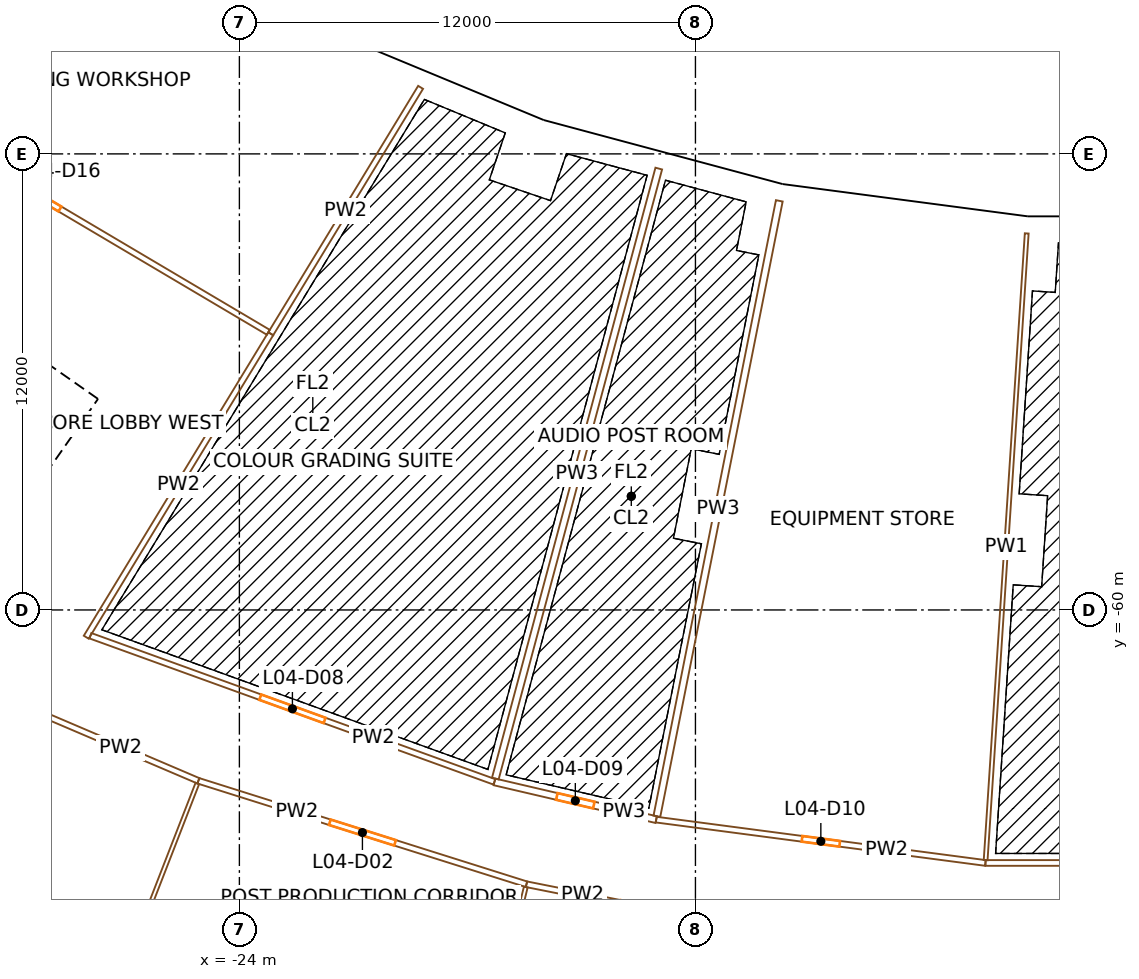
"""IFC4 building model, lengths in metres.
Left out: names, types, materials, properties, quantities, classifications, styles, units other than length and angle.
Written with IfcOpenShell. Run it as: python <this file> out.ifc"""

import sys

from ifc_helpers import new_model, si_unit, direction, frame, frame_2d, origin, origin_2d, place, context, subcontext, project, spatial, rectangle, extrude, element, fill, save


model = new_model("IFC4")
c1 = context("Model", 3, precision=1e-05, world=origin(), true_north=direction((0.0, 1.0)))
c2 = subcontext(c1, "Body", "Model", "MODEL_VIEW")
j1 = project(units=[si_unit("LENGTHUNIT", "METRE"), si_unit("PLANEANGLEUNIT", "RADIAN")], contexts=[c1])
p1 = place(None, origin())
s1 = spatial("IfcSite", under=j1, at=p1, CompositionType="ELEMENT")
p2 = place(p1, origin())
s2 = spatial("IfcBuilding", under=s1, at=p2, CompositionType="ELEMENT")
p3 = place(p2, frame((0.0, 0.0, 31.5)))
s3 = spatial("IfcBuildingStorey", under=s2, at=p3, CompositionType="ELEMENT", Elevation=31.5)
p4 = place(p3, frame((-22.446, -45.516, 0.0), z_axis=(0.0, 0.0, 1.0), x_axis=(0.896872741533, -0.442288690219, 0.0)))
e1 = element("IfcColumn", 1, at=p4, inside=s3, PredefinedType="COLUMN", context=c2, shape_type="SweptSolid", body=[
    extrude(rectangle(XDim=1.1, YDim=1.3, at=origin_2d()), origin(), (0.0, 0.0, 1.0), 4.5),
])
p5 = place(p3, frame((-25.763, -52.243, 0.0), z_axis=(0.0, 0.0, 1.0), x_axis=(0.896872741533, -0.442288690219, 0.0)))
e2 = element("IfcColumn", 2, at=p5, inside=s3, PredefinedType="COLUMN", context=c2, shape_type="SweptSolid", body=[
    extrude(rectangle(XDim=1.4, YDim=1.8, at=origin_2d()), origin(), (0.0, 0.0, 1.0), 4.5),
])
p6 = place(p3, frame((-16.313, -48.057, 0.0), z_axis=(0.0, 0.0, 1.0), x_axis=(0.946930129495, -0.321439465303, 0.0)))
e3 = element("IfcColumn", 3, at=p6, inside=s3, PredefinedType="COLUMN", context=c2, shape_type="SweptSolid", body=[
    extrude(rectangle(XDim=1.1, YDim=1.3, at=origin_2d()), origin(), (0.0, 0.0, 1.0), 4.5),
])
p7 = place(p3, frame((-18.724, -55.159, 0.0), z_axis=(0.0, 0.0, 1.0), x_axis=(0.946930129495, -0.321439465303, 0.0)))
e4 = element("IfcColumn", 4, at=p7, inside=s3, PredefinedType="COLUMN", context=c2, shape_type="SweptSolid", body=[
    extrude(rectangle(XDim=1.4, YDim=1.8, at=origin_2d()), origin(), (0.0, 0.0, 1.0), 4.5),
])
p8 = place(p3, frame((-9.901, -49.775, 0.0), z_axis=(0.0, 0.0, 1.0), x_axis=(0.980785280403, -0.195090322016, 0.0)))
e5 = element("IfcColumn", 5, at=p8, inside=s3, PredefinedType="COLUMN", context=c2, shape_type="SweptSolid", body=[
    extrude(rectangle(XDim=1.1, YDim=1.3, at=origin_2d()), origin(), (0.0, 0.0, 1.0), 4.5),
])
p9 = place(p3, frame((-11.364, -57.131, 0.0), z_axis=(0.0, 0.0, 1.0), x_axis=(0.980785280403, -0.195090322016, 0.0)))
e6 = element("IfcColumn", 6, at=p9, inside=s3, PredefinedType="COLUMN", context=c2, shape_type="SweptSolid", body=[
    extrude(rectangle(XDim=1.4, YDim=1.8, at=origin_2d()), origin(), (0.0, 0.0, 1.0), 4.5),
])
p10 = place(p3, frame((-3.319, -50.641, 0.0), z_axis=(0.0, 0.0, 1.0), x_axis=(0.997858923239, -0.06540312923, 0.0)))
e7 = element("IfcColumn", 7, at=p10, inside=s3, PredefinedType="COLUMN", context=c2, shape_type="SweptSolid", body=[
    extrude(rectangle(XDim=1.1, YDim=1.3, at=origin_2d()), origin(), (0.0, 0.0, 1.0), 4.5),
])
p11 = place(p3, frame((-3.81, -58.125, 0.0), z_axis=(0.0, 0.0, 1.0), x_axis=(0.997858923239, -0.06540312923, 0.0)))
e8 = element("IfcColumn", 8, at=p11, inside=s3, PredefinedType="COLUMN", context=c2, shape_type="SweptSolid", body=[
    extrude(rectangle(XDim=1.4, YDim=1.8, at=origin_2d()), origin(), (0.0, 0.0, 1.0), 4.5),
])
p12 = place(p3, frame((-36.717, -66.337, 0.0), z_axis=(0.0, 0.0, 1.0), x_axis=(0.573577477574, 0.819151315216, 0.0)))
e9 = element("IfcWall", 9, at=p12, inside=s3, PredefinedType="SHEAR", context=c2, shape_type="SweptSolid", body=[
    extrude(rectangle(XDim=14.8, YDim=0.9, at=frame_2d((7.4, 0.0))), origin(), (0.0, 0.0, 1.0), 4.1),
])
p13 = place(p12, frame((6.2, 0.0, 0.0)))
e10 = element("IfcOpeningElement", 10, at=p13, cuts=e9, PredefinedType="OPENING", context=c2, shape_type="SweptSolid", body=[
    extrude(rectangle(XDim=2.4, YDim=2.1, at=frame_2d((1.2, 1.05))), frame((0.0, 0.46, 0.0), z_axis=(0.0, -1.0, 0.0), x_axis=(1.0, 0.0, 0.0)), (0.0, 0.0, 1.0), 0.92),
])
p14 = place(p3, frame((-28.854, -54.324, 0.0), z_axis=(0.0, 0.0, 1.0), x_axis=(-0.819145767589, 0.573585400304, 0.0)))
e11 = element("IfcWall", 11, at=p14, inside=s3, PredefinedType="SHEAR", context=c2, shape_type="SweptSolid", body=[
    extrude(rectangle(XDim=15.045, YDim=0.9, at=frame_2d((7.523, 0.0))), origin(), (0.0, 0.0, 1.0), 4.1),
])
p15 = place(p14, frame((1.05, 0.0, 0.0)))
e12 = element("IfcOpeningElement", 12, at=p15, cuts=e11, PredefinedType="OPENING", context=c2, shape_type="SweptSolid", body=[
    extrude(rectangle(XDim=0.9, YDim=2.1, at=frame_2d((0.45, 1.05))), frame((0.0, 0.46, 0.0), z_axis=(0.0, -1.0, 0.0), x_axis=(1.0, 0.0, 0.0)), (0.0, 0.0, 1.0), 0.92),
])
p16 = place(p14, frame((3.775, 0.0, 0.0)))
e13 = element("IfcOpeningElement", 13, at=p16, cuts=e11, PredefinedType="OPENING", context=c2, shape_type="SweptSolid", body=[
    extrude(rectangle(XDim=1.0, YDim=2.1, at=frame_2d((0.5, 1.05))), frame((0.0, 0.46, 0.0), z_axis=(0.0, -1.0, 0.0), x_axis=(1.0, 0.0, 0.0)), (0.0, 0.0, 1.0), 0.92),
])
p17 = place(p14, frame((6.275, 0.0, 0.0)))
e14 = element("IfcOpeningElement", 14, at=p17, cuts=e11, PredefinedType="OPENING", context=c2, shape_type="SweptSolid", body=[
    extrude(rectangle(XDim=1.0, YDim=2.1, at=frame_2d((0.5, 1.05))), frame((0.0, 0.46, 0.0), z_axis=(0.0, -1.0, 0.0), x_axis=(1.0, 0.0, 0.0)), (0.0, 0.0, 1.0), 0.92),
])
p18 = place(p14, frame((13.495, 0.0, 0.0)))
e15 = element("IfcOpeningElement", 15, at=p18, cuts=e11, PredefinedType="OPENING", context=c2, shape_type="SweptSolid", body=[
    extrude(rectangle(XDim=1.1, YDim=2.1, at=frame_2d((0.55, 1.05))), frame((0.0, 0.46, 0.0), z_axis=(0.0, -1.0, 0.0), x_axis=(1.0, 0.0, 0.0)), (0.0, 0.0, 1.0), 0.92),
])
p19 = place(p3, frame((3.21, -49.868, 0.0), z_axis=(0.0, 0.0, 1.0), x_axis=(-1.0, 0.0, 0.0)))
e16 = element("IfcWall", 16, at=p19, inside=s3, PredefinedType="SOLIDWALL", context=c2, shape_type="SweptSolid", body=[
    extrude(rectangle(XDim=6.419, YDim=0.45, at=frame_2d((3.21, 0.0))), origin(), (0.0, 0.0, 1.0), 3.2),
])
p20 = place(p19, frame((3.66, 0.0, 0.9)))
e17 = element("IfcOpeningElement", 17, at=p20, cuts=e16, PredefinedType="OPENING", context=c2, shape_type="SweptSolid", body=[
    extrude(rectangle(XDim=1.2, YDim=2.15, at=frame_2d((0.6, 1.075))), frame((0.0, 0.235, 0.0), z_axis=(0.0, -1.0, 0.0), x_axis=(1.0, 0.0, 0.0)), (0.0, 0.0, 1.0), 0.47),
])
p21 = place(p19, frame((1.56, 0.0, 0.9)))
e18 = element("IfcOpeningElement", 18, at=p21, cuts=e16, PredefinedType="OPENING", context=c2, shape_type="SweptSolid", body=[
    extrude(rectangle(XDim=1.2, YDim=2.15, at=frame_2d((0.6, 1.075))), frame((0.0, 0.235, 0.0), z_axis=(0.0, -1.0, 0.0), x_axis=(1.0, 0.0, 0.0)), (0.0, 0.0, 1.0), 0.47),
])
p22 = place(p3, frame((-16.036, -47.335, 0.0), z_axis=(0.0, 0.0, 1.0), x_axis=(-0.923877459804, 0.382688436284, 0.0)))
e19 = element("IfcWall", 19, at=p22, inside=s3, PredefinedType="SOLIDWALL", context=c2, shape_type="SweptSolid", body=[
    extrude(rectangle(XDim=6.597, YDim=0.45, at=frame_2d((3.299, 0.0))), origin(), (0.0, 0.0, 1.0), 3.2),
])
p23 = place(p22, frame((3.749, 0.0, 0.9)))
e20 = element("IfcOpeningElement", 20, at=p23, cuts=e19, PredefinedType="OPENING", context=c2, shape_type="SweptSolid", body=[
    extrude(rectangle(XDim=1.2, YDim=2.15, at=frame_2d((0.6, 1.075))), frame((0.0, 0.235, 0.0), z_axis=(0.0, -1.0, 0.0), x_axis=(1.0, 0.0, 0.0)), (0.0, 0.0, 1.0), 0.47),
])
p24 = place(p22, frame((1.648, 0.0, 0.9)))
e21 = element("IfcOpeningElement", 21, at=p24, cuts=e19, PredefinedType="OPENING", context=c2, shape_type="SweptSolid", body=[
    extrude(rectangle(XDim=1.2, YDim=2.15, at=frame_2d((0.6, 1.075))), frame((0.0, 0.235, 0.0), z_axis=(0.0, -1.0, 0.0), x_axis=(1.0, 0.0, 0.0)), (0.0, 0.0, 1.0), 0.47),
])
p25 = place(p3, frame((-9.807, -49.0, 0.0), z_axis=(0.0, 0.0, 1.0), x_axis=(-0.965926830738, 0.25881529642, 0.0)))
e22 = element("IfcWall", 22, at=p25, inside=s3, PredefinedType="SOLIDWALL", context=c2, shape_type="SweptSolid", body=[
    extrude(rectangle(XDim=6.419, YDim=0.45, at=frame_2d((3.209, 0.0))), origin(), (0.0, 0.0, 1.0), 3.2),
])
p26 = place(p25, frame((3.66, 0.0, 0.9)))
e23 = element("IfcOpeningElement", 23, at=p26, cuts=e22, PredefinedType="OPENING", context=c2, shape_type="SweptSolid", body=[
    extrude(rectangle(XDim=1.2, YDim=2.15, at=frame_2d((0.6, 1.075))), frame((0.0, 0.235, 0.0), z_axis=(0.0, -1.0, 0.0), x_axis=(1.0, 0.0, 0.0)), (0.0, 0.0, 1.0), 0.47),
])
p27 = place(p25, frame((1.56, 0.0, 0.9)))
e24 = element("IfcOpeningElement", 24, at=p27, cuts=e22, PredefinedType="OPENING", context=c2, shape_type="SweptSolid", body=[
    extrude(rectangle(XDim=1.2, YDim=2.15, at=frame_2d((0.6, 1.075))), frame((0.0, 0.235, 0.0), z_axis=(0.0, -1.0, 0.0), x_axis=(1.0, 0.0, 0.0)), (0.0, 0.0, 1.0), 0.47),
])
p28 = place(p3, frame((-3.239, -49.872, 0.0), z_axis=(0.0, 0.0, 1.0), x_axis=(-0.991445350147, 0.130522479563, 0.0)))
e25 = element("IfcWall", 25, at=p28, inside=s3, PredefinedType="SOLIDWALL", context=c2, shape_type="SweptSolid", body=[
    extrude(rectangle(XDim=6.597, YDim=0.45, at=frame_2d((3.299, 0.0))), origin(), (0.0, 0.0, 1.0), 3.2),
])
p29 = place(p28, frame((3.749, 0.0, 0.9)))
e26 = element("IfcOpeningElement", 26, at=p29, cuts=e25, PredefinedType="OPENING", context=c2, shape_type="SweptSolid", body=[
    extrude(rectangle(XDim=1.2, YDim=2.15, at=frame_2d((0.6, 1.075))), frame((0.0, 0.235, 0.0), z_axis=(0.0, -1.0, 0.0), x_axis=(1.0, 0.0, 0.0)), (0.0, 0.0, 1.0), 0.47),
])
p30 = place(p28, frame((1.648, 0.0, 0.9)))
e27 = element("IfcOpeningElement", 27, at=p30, cuts=e25, PredefinedType="OPENING", context=c2, shape_type="SweptSolid", body=[
    extrude(rectangle(XDim=1.2, YDim=2.15, at=frame_2d((0.6, 1.075))), frame((0.0, 0.235, 0.0), z_axis=(0.0, -1.0, 0.0), x_axis=(1.0, 0.0, 0.0)), (0.0, 0.0, 1.0), 0.47),
])
p31 = place(p3, frame((-35.065, -45.697, 0.0), z_axis=(0.0, 0.0, 1.0), x_axis=(0.860638818745, -0.509215891022, 0.0)))
e28 = element("IfcWall", 28, at=p31, inside=s3, PredefinedType="PARTITIONING", context=c2, shape_type="SweptSolid", body=[
    extrude(rectangle(XDim=13.741, YDim=0.15, at=frame_2d((6.871, 0.0))), origin(), (0.0, 0.0, 1.0), 3.1),
])
p32 = place(p31, frame((6.37, 0.0, 0.0)))
e29 = element("IfcOpeningElement", 29, at=p32, cuts=e28, PredefinedType="OPENING", context=c2, shape_type="SweptSolid", body=[
    extrude(rectangle(XDim=1.0, YDim=2.1, at=frame_2d((0.5, 1.05))), frame((0.0, 0.085, 0.0), z_axis=(0.0, -1.0, 0.0), x_axis=(1.0, 0.0, 0.0)), (0.0, 0.0, 1.0), 0.17),
])
p33 = place(p3, frame((-31.035, -79.814, 0.0), z_axis=(0.0, 0.0, 1.0), x_axis=(0.362399453939, 0.932022872995, 0.0)))
e30 = element("IfcWall", 30, at=p33, inside=s3, PredefinedType="PARTITIONING", context=c2, shape_type="SweptSolid", body=[
    extrude(rectangle(XDim=16.361, YDim=0.1, at=frame_2d((8.18, 0.0))), origin(), (0.0, 0.0, 1.0), 3.1),
])
p34 = place(p3, frame((-29.177, -62.746, 0.0), z_axis=(0.0, 0.0, 1.0), x_axis=(0.91966288709, -0.392708765001, 0.0)))
e31 = element("IfcWall", 31, at=p34, inside=s3, PredefinedType="PARTITIONING", context=c2, shape_type="SweptSolid", body=[
    extrude(rectangle(XDim=4.456, YDim=0.15, at=frame_2d((2.228, 0.0))), origin(), (0.0, 0.0, 1.0), 3.1),
])
p35 = place(p3, frame((-27.92, -60.678, 0.0), z_axis=(0.0, 0.0, 1.0), x_axis=(0.940369024046, -0.340155991589, 0.0)))
e32 = element("IfcWall", 32, at=p35, inside=s3, PredefinedType="PARTITIONING", context=c2, shape_type="SweptSolid", body=[
    extrude(rectangle(XDim=11.305, YDim=0.15, at=frame_2d((5.652, 0.0))), origin(), (0.0, 0.0, 1.0), 3.1),
])
p36 = place(p35, frame((4.752, 0.0, 0.0)))
e33 = element("IfcOpeningElement", 33, at=p36, cuts=e32, PredefinedType="OPENING", context=c2, shape_type="SweptSolid", body=[
    extrude(rectangle(XDim=1.8, YDim=2.1, at=frame_2d((0.9, 1.05))), frame((0.0, 0.085, 0.0), z_axis=(0.0, -1.0, 0.0), x_axis=(1.0, 0.0, 0.0)), (0.0, 0.0, 1.0), 0.17),
])
p37 = place(p3, frame((-16.446, -67.217, 0.0), z_axis=(0.0, 0.0, 1.0), x_axis=(-0.953724416281, 0.300682120834, 0.0)))
e34 = element("IfcWall", 34, at=p37, inside=s3, PredefinedType="PARTITIONING", context=c2, shape_type="SweptSolid", body=[
    extrude(rectangle(XDim=9.052, YDim=0.15, at=frame_2d((4.526, 0.0))), origin(), (0.0, 0.0, 1.0), 3.1),
])
p38 = place(p37, frame((3.626, 0.0, 0.0)))
e35 = element("IfcOpeningElement", 35, at=p38, cuts=e34, PredefinedType="OPENING", context=c2, shape_type="SweptSolid", body=[
    extrude(rectangle(XDim=1.8, YDim=2.1, at=frame_2d((0.9, 1.05))), frame((0.0, 0.085, 0.0), z_axis=(0.0, -1.0, 0.0), x_axis=(1.0, 0.0, 0.0)), (0.0, 0.0, 1.0), 0.17),
])
p39 = place(p3, frame((-23.174, -52.732, 0.0), z_axis=(0.0, 0.0, 1.0), x_axis=(-0.519577254173, -0.854423476355, 0.0)))
e36 = element("IfcWall", 36, at=p39, inside=s3, PredefinedType="PARTITIONING", context=c2, shape_type="SweptSolid", body=[
    extrude(rectangle(XDim=9.345, YDim=0.15, at=frame_2d((4.672, 0.0))), origin(), (0.0, 0.0, 1.0), 3.1),
])
p40 = place(p3, frame((-20.352, -83.182, 0.0), z_axis=(0.0, 0.0, 1.0), x_axis=(0.23765209547, 0.971350339228, 0.0)))
e37 = element("IfcWall", 37, at=p40, inside=s3, PredefinedType="PARTITIONING", context=c2, shape_type="SweptSolid", body=[
    extrude(rectangle(XDim=16.361, YDim=0.1, at=frame_2d((8.18, 0.0))), origin(), (0.0, 0.0, 1.0), 3.1),
])
p41 = place(p3, frame((-19.231, -46.249, 0.0), z_axis=(0.0, 0.0, 1.0), x_axis=(-0.519582509181, -0.854420280748, 0.0)))
e38 = element("IfcWall", 38, at=p41, inside=s3, PredefinedType="PARTITIONING", context=c2, shape_type="SweptSolid", body=[
    extrude(rectangle(XDim=7.588, YDim=0.15, at=frame_2d((3.794, 0.0))), origin(), (0.0, 0.0, 1.0), 3.1),
])
p42 = place(p3, frame((-17.289, -64.524, 0.0), z_axis=(0.0, 0.0, 1.0), x_axis=(0.973886095728, -0.227037161159, 0.0)))
e39 = element("IfcWall", 39, at=p42, inside=s3, PredefinedType="PARTITIONING", context=c2, shape_type="SweptSolid", body=[
    extrude(rectangle(XDim=4.371, YDim=0.18, at=frame_2d((2.186, 0.0))), origin(), (0.0, 0.0, 1.0), 3.1),
])
p43 = place(p42, frame((1.686, 0.0, 0.0)))
e40 = element("IfcOpeningElement", 40, at=p43, cuts=e39, PredefinedType="OPENING", context=c2, shape_type="SweptSolid", body=[
    extrude(rectangle(XDim=1.0, YDim=2.1, at=frame_2d((0.5, 1.05))), frame((0.0, 0.1, 0.0), z_axis=(0.0, -1.0, 0.0), x_axis=(1.0, 0.0, 0.0)), (0.0, 0.0, 1.0), 0.2),
])
p44 = place(p3, frame((-10.529, -68.394, 0.0), z_axis=(0.0, 0.0, 1.0), x_axis=(-0.980785582749, 0.195088802015, 0.0)))
e41 = element("IfcWall", 41, at=p44, inside=s3, PredefinedType="PARTITIONING", context=c2, shape_type="SweptSolid", body=[
    extrude(rectangle(XDim=6.033, YDim=0.15, at=frame_2d((3.017, 0.0))), origin(), (0.0, 0.0, 1.0), 3.1),
])
p45 = place(p44, frame((2.517, 0.0, 0.0)))
e42 = element("IfcOpeningElement", 42, at=p45, cuts=e41, PredefinedType="OPENING", context=c2, shape_type="SweptSolid", body=[
    extrude(rectangle(XDim=1.0, YDim=2.1, at=frame_2d((0.5, 1.05))), frame((0.0, 0.085, 0.0), z_axis=(0.0, -1.0, 0.0), x_axis=(1.0, 0.0, 0.0)), (0.0, 0.0, 1.0), 0.17),
])
p46 = place(p3, frame((-13.032, -65.516, 0.0), z_axis=(0.0, 0.0, 1.0), x_axis=(0.991443260322, -0.130538352841, 0.0)))
e43 = element("IfcWall", 43, at=p46, inside=s3, PredefinedType="PARTITIONING", context=c2, shape_type="SweptSolid", body=[
    extrude(rectangle(XDim=8.738, YDim=0.15, at=frame_2d((4.369, 0.0))), origin(), (0.0, 0.0, 1.0), 3.1),
])
p47 = place(p46, frame((3.869, 0.0, 0.0)))
e44 = element("IfcOpeningElement", 44, at=p47, cuts=e43, PredefinedType="OPENING", context=c2, shape_type="SweptSolid", body=[
    extrude(rectangle(XDim=1.0, YDim=2.1, at=frame_2d((0.5, 1.05))), frame((0.0, 0.085, 0.0), z_axis=(0.0, -1.0, 0.0), x_axis=(1.0, 0.0, 0.0)), (0.0, 0.0, 1.0), 0.17),
])
p48 = place(p3, frame((-12.965, -48.386, 0.0), z_axis=(0.0, 0.0, 1.0), x_axis=(-0.258822009397, -0.965925032004, 0.0)))
e45 = element("IfcWall", 45, at=p48, inside=s3, PredefinedType="PARTITIONING", context=c2, shape_type="SweptSolid", body=[
    extrude(rectangle(XDim=16.617, YDim=0.18, at=frame_2d((8.308, 0.0))), origin(), (0.0, 0.0, 1.0), 3.1),
])
p49 = place(p3, frame((-9.793, -49.235, 0.0), z_axis=(0.0, 0.0, 1.0), x_axis=(-0.195089444663, -0.980785454919, 0.0)))
e46 = element("IfcWall", 46, at=p49, inside=s3, PredefinedType="PARTITIONING", context=c2, shape_type="SweptSolid", body=[
    extrude(rectangle(XDim=16.51, YDim=0.18, at=frame_2d((8.255, 0.0))), origin(), (0.0, 0.0, 1.0), 3.1),
])
p50 = place(p3, frame((-4.369, -66.657, 0.0), z_axis=(0.0, 0.0, 1.0), x_axis=(1.0, 0.0, 0.0)))
e47 = element("IfcWall", 47, at=p50, inside=s3, PredefinedType="PARTITIONING", context=c2, shape_type="SweptSolid", body=[
    extrude(rectangle(XDim=8.738, YDim=0.15, at=frame_2d((4.369, 0.0))), origin(), (0.0, 0.0, 1.0), 3.1),
])
p51 = place(p50, frame((3.869, 0.0, 0.0)))
e48 = element("IfcOpeningElement", 48, at=p51, cuts=e47, PredefinedType="OPENING", context=c2, shape_type="SweptSolid", body=[
    extrude(rectangle(XDim=1.0, YDim=2.1, at=frame_2d((0.5, 1.05))), frame((0.0, 0.085, 0.0), z_axis=(0.0, -1.0, 0.0), x_axis=(1.0, 0.0, 0.0)), (0.0, 0.0, 1.0), 0.17),
])
p52 = place(p3, frame((-3.283, -50.093, 0.0), z_axis=(0.0, 0.0, 1.0), x_axis=(-0.065405026615, -0.997858798876, 0.0)))
e49 = element("IfcWall", 49, at=p52, inside=s3, PredefinedType="PARTITIONING", context=c2, shape_type="SweptSolid", body=[
    extrude(rectangle(XDim=16.525, YDim=0.1, at=frame_2d((8.262, 0.0))), origin(), (0.0, 0.0, 1.0), 3.1),
])
p53 = place(p23, origin())
e50 = element("IfcWindow", 50, at=p53, inside=s3, PartitioningType="SINGLE_PANEL", PredefinedType="WINDOW", context=c2, shape_type="SweptSolid", body=[
    extrude(rectangle(XDim=1.2, YDim=2.15, at=frame_2d((0.6, 1.075))), frame((0.0, 0.03, 0.0), z_axis=(0.0, -1.0, 0.0), x_axis=(1.0, 0.0, 0.0)), (0.0, 0.0, 1.0), 0.06),
])
fill(e20, e50)
p54 = place(p24, origin())
e51 = element("IfcWindow", 51, at=p54, inside=s3, PartitioningType="SINGLE_PANEL", PredefinedType="WINDOW", context=c2, shape_type="SweptSolid", body=[
    extrude(rectangle(XDim=1.2, YDim=2.15, at=frame_2d((0.6, 1.075))), frame((0.0, 0.03, 0.0), z_axis=(0.0, -1.0, 0.0), x_axis=(1.0, 0.0, 0.0)), (0.0, 0.0, 1.0), 0.06),
])
fill(e21, e51)
p55 = place(p26, origin())
e52 = element("IfcWindow", 52, at=p55, inside=s3, PartitioningType="SINGLE_PANEL", PredefinedType="WINDOW", context=c2, shape_type="SweptSolid", body=[
    extrude(rectangle(XDim=1.2, YDim=2.15, at=frame_2d((0.6, 1.075))), frame((0.0, 0.03, 0.0), z_axis=(0.0, -1.0, 0.0), x_axis=(1.0, 0.0, 0.0)), (0.0, 0.0, 1.0), 0.06),
])
fill(e23, e52)
p56 = place(p27, origin())
e53 = element("IfcWindow", 53, at=p56, inside=s3, PartitioningType="SINGLE_PANEL", PredefinedType="WINDOW", context=c2, shape_type="SweptSolid", body=[
    extrude(rectangle(XDim=1.2, YDim=2.15, at=frame_2d((0.6, 1.075))), frame((0.0, 0.03, 0.0), z_axis=(0.0, -1.0, 0.0), x_axis=(1.0, 0.0, 0.0)), (0.0, 0.0, 1.0), 0.06),
])
fill(e24, e53)
p57 = place(p29, origin())
e54 = element("IfcWindow", 54, at=p57, inside=s3, PartitioningType="SINGLE_PANEL", PredefinedType="WINDOW", context=c2, shape_type="SweptSolid", body=[
    extrude(rectangle(XDim=1.2, YDim=2.15, at=frame_2d((0.6, 1.075))), frame((0.0, 0.03, 0.0), z_axis=(0.0, -1.0, 0.0), x_axis=(1.0, 0.0, 0.0)), (0.0, 0.0, 1.0), 0.06),
])
fill(e26, e54)
p58 = place(p30, origin())
e55 = element("IfcWindow", 55, at=p58, inside=s3, PartitioningType="SINGLE_PANEL", PredefinedType="WINDOW", context=c2, shape_type="SweptSolid", body=[
    extrude(rectangle(XDim=1.2, YDim=2.15, at=frame_2d((0.6, 1.075))), frame((0.0, 0.03, 0.0), z_axis=(0.0, -1.0, 0.0), x_axis=(1.0, 0.0, 0.0)), (0.0, 0.0, 1.0), 0.06),
])
fill(e27, e55)
p59 = place(p38, origin())
e56 = element("IfcDoor", 56, at=p59, inside=s3, OperationType="DOUBLE_DOOR_SINGLE_SWING", PredefinedType="DOOR", context=c2, shape_type="SweptSolid", body=[
    extrude(rectangle(XDim=1.8, YDim=2.1, at=frame_2d((0.9, 1.05))), frame((0.0, 0.025, 0.0), z_axis=(0.0, -1.0, 0.0), x_axis=(1.0, 0.0, 0.0)), (0.0, 0.0, 1.0), 0.05),
])
fill(e35, e56)
p60 = place(p36, origin())
e57 = element("IfcDoor", 57, at=p60, inside=s3, OperationType="DOUBLE_DOOR_SINGLE_SWING", PredefinedType="DOOR", context=c2, shape_type="SweptSolid", body=[
    extrude(rectangle(XDim=1.8, YDim=2.1, at=frame_2d((0.9, 1.05))), frame((0.0, 0.025, 0.0), z_axis=(0.0, -1.0, 0.0), x_axis=(1.0, 0.0, 0.0)), (0.0, 0.0, 1.0), 0.05),
])
fill(e33, e57)
p61 = place(p43, origin())
e58 = element("IfcDoor", 58, at=p61, inside=s3, OperationType="SINGLE_SWING_RIGHT", PredefinedType="DOOR", context=c2, shape_type="SweptSolid", body=[
    extrude(rectangle(XDim=1.0, YDim=2.1, at=frame_2d((0.5, 1.05))), frame((0.0, 0.025, 0.0), z_axis=(0.0, -1.0, 0.0), x_axis=(1.0, 0.0, 0.0)), (0.0, 0.0, 1.0), 0.05),
])
fill(e40, e58)
p62 = place(p47, origin())
e59 = element("IfcDoor", 59, at=p62, inside=s3, OperationType="SINGLE_SWING_RIGHT", PredefinedType="DOOR", context=c2, shape_type="SweptSolid", body=[
    extrude(rectangle(XDim=1.0, YDim=2.1, at=frame_2d((0.5, 1.05))), frame((0.0, 0.025, 0.0), z_axis=(0.0, -1.0, 0.0), x_axis=(1.0, 0.0, 0.0)), (0.0, 0.0, 1.0), 0.05),
])
fill(e44, e59)
p63 = place(p32, origin())
e60 = element("IfcDoor", 60, at=p63, inside=s3, OperationType="SINGLE_SWING_RIGHT", PredefinedType="DOOR", context=c2, shape_type="SweptSolid", body=[
    extrude(rectangle(XDim=1.0, YDim=2.1, at=frame_2d((0.5, 1.05))), frame((0.0, 0.025, 0.0), z_axis=(0.0, -1.0, 0.0), x_axis=(1.0, 0.0, 0.0)), (0.0, 0.0, 1.0), 0.05),
])
fill(e29, e60)
save(model, sys.argv[1])
